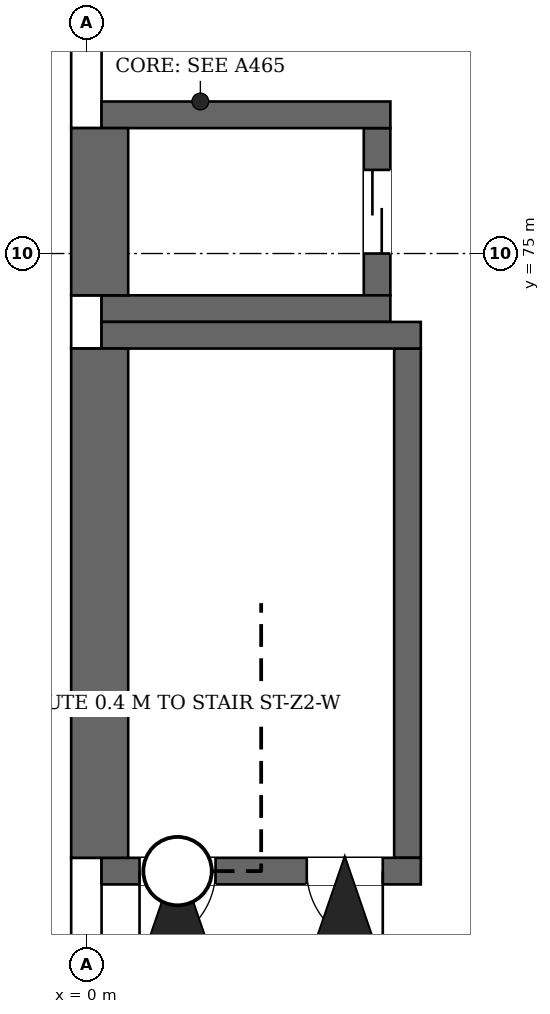
"""IFC4 building model, lengths in metres.
Left out: names, types, materials, properties, quantities, classifications, styles, units other than length and angle.
Written with IfcOpenShell. Run it as: python <this file> out.ifc"""

import sys

from ifc_helpers import new_model, si_unit, direction, frame, frame_2d, origin, place, context, subcontext, project, spatial, rectangle, extrude, element, fill, save


model = new_model("IFC4")
c1 = context("Model", 3, precision=1e-05, world=origin(), true_north=direction((0.0, 1.0)))
c2 = subcontext(c1, "Body", "Model", "MODEL_VIEW")
j1 = project(units=[si_unit("LENGTHUNIT", "METRE"), si_unit("PLANEANGLEUNIT", "RADIAN")], contexts=[c1])
p1 = place(None, origin())
s1 = spatial("IfcSite", under=j1, at=p1, CompositionType="ELEMENT")
p2 = place(p1, origin())
s2 = spatial("IfcBuilding", under=s1, at=p2, CompositionType="ELEMENT")
p3 = place(p2, frame((0.0, 0.0, 31.9)))
s3 = spatial("IfcBuildingStorey", under=s2, at=p3, CompositionType="ELEMENT", Elevation=31.9)
p4 = place(p3, frame((0.2, 66.875, 0.0), z_axis=(0.0, 0.0, 1.0), x_axis=(1.0, 0.0, 0.0)))
e1 = element("IfcWall", 1, at=p4, inside=s3, PredefinedType="SHEAR", context=c2, shape_type="SweptSolid", body=[
    extrude(rectangle(XDim=4.2, YDim=0.35, at=frame_2d((2.1, 0.0))), origin(), (0.0, 0.0, 1.0), 3.2),
])
p5 = place(p4, frame((0.5, 0.0, 0.0)))
e2 = element("IfcOpeningElement", 2, at=p5, cuts=e1, PredefinedType="OPENING", context=c2, shape_type="SweptSolid", body=[
    extrude(rectangle(XDim=1.0, YDim=2.1, at=frame_2d((0.5, 1.05))), frame((0.0, 0.185, 0.0), z_axis=(0.0, -1.0, 0.0), x_axis=(1.0, 0.0, 0.0)), (0.0, 0.0, 1.0), 0.37),
])
p6 = place(p4, frame((2.7, 0.0, 0.0)))
e3 = element("IfcOpeningElement", 3, at=p6, cuts=e1, PredefinedType="OPENING", context=c2, shape_type="SweptSolid", body=[
    extrude(rectangle(XDim=1.0, YDim=2.1, at=frame_2d((0.5, 1.05))), frame((0.0, 0.185, 0.0), z_axis=(0.0, -1.0, 0.0), x_axis=(1.0, 0.0, 0.0)), (0.0, 0.0, 1.0), 0.37),
])
p7 = place(p3, frame((0.2, 73.925, 0.0), z_axis=(0.0, 0.0, 1.0), x_axis=(1.0, 0.0, 0.0)))
e4 = element("IfcWall", 4, at=p7, inside=s3, PredefinedType="SHEAR", context=c2, shape_type="SweptSolid", body=[
    extrude(rectangle(XDim=4.2, YDim=0.35, at=frame_2d((2.1, 0.0))), origin(), (0.0, 0.0, 1.0), 3.2),
])
p8 = place(p3, frame((0.176, 67.05, 0.0), z_axis=(0.0, 0.0, 1.0), x_axis=(0.0, 1.0, 0.0)))
e5 = element("IfcWall", 5, at=p8, inside=s3, PredefinedType="SHEAR", context=c2, shape_type="SweptSolid", body=[
    extrude(rectangle(XDim=6.7, YDim=0.75, at=frame_2d((3.35, 0.0))), origin(), (0.0, 0.0, 1.0), 3.2),
])
p9 = place(p3, frame((4.225, 67.05, 0.0), z_axis=(0.0, 0.0, 1.0), x_axis=(0.0, 1.0, 0.0)))
e6 = element("IfcWall", 6, at=p9, inside=s3, PredefinedType="SHEAR", context=c2, shape_type="SweptSolid", body=[
    extrude(rectangle(XDim=6.7, YDim=0.35, at=frame_2d((3.35, 0.0))), origin(), (0.0, 0.0, 1.0), 3.2),
])
for number, where, z_axis, x_axis in (
    (7, (0.2, 74.275, 0.0), (0.0, 0.0, 1.0), (1.0, 0.0, 0.0)),
    (8, (0.2, 76.825, 0.0), (0.0, 0.0, 1.0), (1.0, 0.0, 0.0)),
):
    element("IfcWall", number, at=place(p3, frame(where, z_axis=z_axis, x_axis=x_axis)), inside=s3, PredefinedType="SHEAR", context=c2, shape_type="SweptSolid", body=[
        extrude(rectangle(XDim=3.8, YDim=0.35, at=frame_2d((1.9, 0.0))), origin(), (0.0, 0.0, 1.0), 4.2),
    ])
p10 = place(p3, frame((0.176, 74.45, 0.0), z_axis=(0.0, 0.0, 1.0), x_axis=(0.0, 1.0, 0.0)))
e9 = element("IfcWall", 9, at=p10, inside=s3, PredefinedType="SHEAR", context=c2, shape_type="SweptSolid", body=[
    extrude(rectangle(XDim=2.2, YDim=0.75, at=frame_2d((1.1, 0.0))), origin(), (0.0, 0.0, 1.0), 4.2),
])
p11 = place(p3, frame((3.825, 74.45, 0.0), z_axis=(0.0, 0.0, 1.0), x_axis=(0.0, 1.0, 0.0)))
e10 = element("IfcWall", 10, at=p11, inside=s3, PredefinedType="SHEAR", context=c2, shape_type="SweptSolid", body=[
    extrude(rectangle(XDim=2.2, YDim=0.35, at=frame_2d((1.1, 0.0))), origin(), (0.0, 0.0, 1.0), 4.2),
])
p12 = place(p11, frame((0.55, 0.0, 0.0)))
e11 = element("IfcOpeningElement", 11, at=p12, cuts=e10, PredefinedType="OPENING", context=c2, shape_type="SweptSolid", body=[
    extrude(rectangle(XDim=1.1, YDim=2.1, at=frame_2d((0.55, 1.05))), frame((0.0, 0.185, 0.0), z_axis=(0.0, -1.0, 0.0), x_axis=(1.0, 0.0, 0.0)), (0.0, 0.0, 1.0), 0.37),
])
p13 = place(p3, frame((0.0, 67.05, 0.0), z_axis=(0.0, 0.0, 1.0), x_axis=(0.0, -1.0, 0.0)))
e12 = element("IfcWall", 12, at=p13, inside=s3, PredefinedType="PARAPET", context=c2, shape_type="SweptSolid", body=[
    extrude(rectangle(XDim=4.4, YDim=0.4, at=frame_2d((2.2, 0.0))), origin(), (0.0, 0.0, 1.0), 1.1),
])
p14 = place(p3, frame((0.0, 74.45, 0.0), z_axis=(0.0, 0.0, 1.0), x_axis=(0.0, -1.0, 0.0)))
e13 = element("IfcWall", 13, at=p14, inside=s3, PredefinedType="PARAPET", context=c2, shape_type="SweptSolid", body=[
    extrude(rectangle(XDim=0.7, YDim=0.4, at=frame_2d((0.35, 0.0))), origin(), (0.0, 0.0, 1.0), 1.1),
])
p15 = place(p3, frame((0.0, 94.08, 0.0), z_axis=(0.0, 0.0, 1.0), x_axis=(0.0, -1.0, 0.0)))
e14 = element("IfcWall", 14, at=p15, inside=s3, PredefinedType="PARAPET", context=c2, shape_type="SweptSolid", body=[
    extrude(rectangle(XDim=17.43, YDim=0.4, at=frame_2d((8.715, 0.0))), origin(), (0.0, 0.0, 1.0), 1.1),
])
p16 = place(p5, frame((1.0, 0.0, 0.0), z_axis=(0.0, 0.0, 1.0), x_axis=(-1.0, 0.0, 0.0)))
e15 = element("IfcDoor", 15, at=p16, inside=s3, OperationType="SINGLE_SWING_LEFT", PredefinedType="DOOR", context=c2, shape_type="SweptSolid", body=[
    extrude(rectangle(XDim=1.0, YDim=2.1, at=frame_2d((0.5, 1.05))), frame((0.0, 0.025, 0.0), z_axis=(0.0, -1.0, 0.0), x_axis=(1.0, 0.0, 0.0)), (0.0, 0.0, 1.0), 0.05),
])
fill(e2, e15)
p17 = place(p6, frame((1.0, 0.0, 0.0), z_axis=(0.0, 0.0, 1.0), x_axis=(-1.0, 0.0, 0.0)))
e16 = element("IfcDoor", 16, at=p17, inside=s3, OperationType="SINGLE_SWING_RIGHT", PredefinedType="DOOR", context=c2, shape_type="SweptSolid", body=[
    extrude(rectangle(XDim=1.0, YDim=2.1, at=frame_2d((0.5, 1.05))), frame((0.0, 0.025, 0.0), z_axis=(0.0, -1.0, 0.0), x_axis=(1.0, 0.0, 0.0)), (0.0, 0.0, 1.0), 0.05),
])
fill(e3, e16)
p18 = place(p12, origin())
e17 = element("IfcDoor", 17, at=p18, inside=s3, OperationType="DOUBLE_DOOR_SLIDING", PredefinedType="DOOR", context=c2, shape_type="SweptSolid", body=[
    extrude(rectangle(XDim=1.1, YDim=2.1, at=frame_2d((0.55, 1.05))), frame((0.0, 0.025, 0.0), z_axis=(0.0, -1.0, 0.0), x_axis=(1.0, 0.0, 0.0)), (0.0, 0.0, 1.0), 0.05),
])
fill(e11, e17)
save(model, sys.argv[1])
